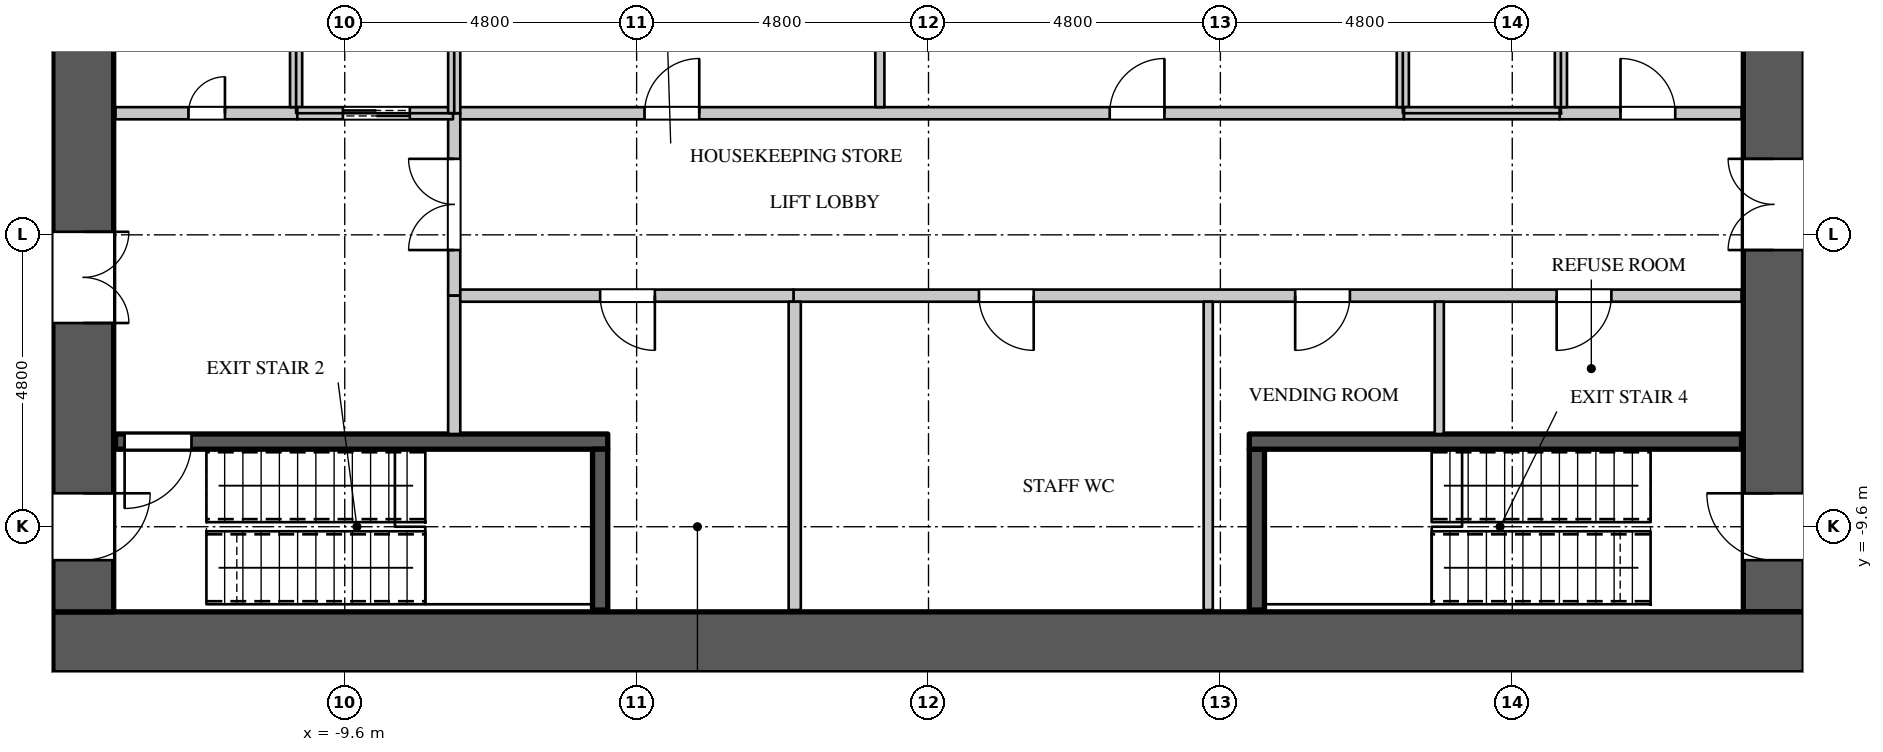
"""IFC4 building model, lengths in metres.
Left out: names, types, materials, properties, quantities, classifications, styles, units other than length and angle.
Written with IfcOpenShell. Run it as: python <this file> out.ifc"""

import sys

from ifc_helpers import new_model, si_unit, direction, frame, frame_2d, origin, place, context, subcontext, project, spatial, rectangle, extrude, element, fill, save


model = new_model("IFC4")
c1 = context("Model", 3, precision=1e-05, world=origin(), true_north=direction((0.0, 1.0)))
c2 = subcontext(c1, "Body", "Model", "MODEL_VIEW")
j1 = project(units=[si_unit("LENGTHUNIT", "METRE"), si_unit("PLANEANGLEUNIT", "RADIAN")], contexts=[c1])
p1 = place(None, origin())
s1 = spatial("IfcSite", under=j1, at=p1, CompositionType="ELEMENT")
p2 = place(p1, origin())
s2 = spatial("IfcBuilding", under=s1, at=p2, CompositionType="ELEMENT")
p3 = place(p2, frame((0.0, 0.0, 38.1)))
s3 = spatial("IfcBuildingStorey", under=s2, at=p3, CompositionType="ELEMENT", Elevation=38.1)
p4 = place(p3, frame((-14.4, -11.5, 0.0), z_axis=(0.0, 0.0, 1.0), x_axis=(1.0, 0.0, 0.0)))
e1 = element("IfcWall", 1, at=p4, inside=s3, PredefinedType="SHEAR", context=c2, shape_type="SweptSolid", body=[
    extrude(rectangle(XDim=28.8, YDim=1.0, at=frame_2d((14.4, 0.0))), origin(), (0.0, 0.0, 1.0), 4.2),
])
p5 = place(p3, frame((13.9, -11.0, 0.0), z_axis=(0.0, 0.0, 1.0), x_axis=(0.0, 1.0, 0.0)))
e2 = element("IfcWall", 2, at=p5, inside=s3, PredefinedType="SHEAR", context=c2, shape_type="SweptSolid", body=[
    extrude(rectangle(XDim=22.0, YDim=1.0, at=frame_2d((11.0, 0.0))), origin(), (0.0, 0.0, 1.0), 4.2),
])
p6 = place(p5, frame((20.05, 0.0, 0.0)))
e3 = element("IfcOpeningElement", 3, at=p6, cuts=e2, PredefinedType="OPENING", context=c2, shape_type="SweptSolid", body=[
    extrude(rectangle(XDim=1.1, YDim=2.2, at=frame_2d((0.55, 1.1))), frame((0.0, 0.51, 0.0), z_axis=(0.0, -1.0, 0.0), x_axis=(1.0, 0.0, 0.0)), (0.0, 0.0, 1.0), 1.02),
])
p7 = place(p5, frame((0.85, 0.0, 0.0)))
e4 = element("IfcOpeningElement", 4, at=p7, cuts=e2, PredefinedType="OPENING", context=c2, shape_type="SweptSolid", body=[
    extrude(rectangle(XDim=1.1, YDim=2.2, at=frame_2d((0.55, 1.1))), frame((0.0, 0.51, 0.0), z_axis=(0.0, -1.0, 0.0), x_axis=(1.0, 0.0, 0.0)), (0.0, 0.0, 1.0), 1.02),
])
p8 = place(p5, frame((14.55, 0.0, 0.0)))
e5 = element("IfcOpeningElement", 5, at=p8, cuts=e2, PredefinedType="OPENING", context=c2, shape_type="SweptSolid", body=[
    extrude(rectangle(XDim=1.5, YDim=2.4, at=frame_2d((0.75, 1.2))), frame((0.0, 0.51, 0.0), z_axis=(0.0, -1.0, 0.0), x_axis=(1.0, 0.0, 0.0)), (0.0, 0.0, 1.0), 1.02),
])
p9 = place(p5, frame((5.95, 0.0, 0.0)))
e6 = element("IfcOpeningElement", 6, at=p9, cuts=e2, PredefinedType="OPENING", context=c2, shape_type="SweptSolid", body=[
    extrude(rectangle(XDim=1.5, YDim=2.4, at=frame_2d((0.75, 1.2))), frame((0.0, 0.51, 0.0), z_axis=(0.0, -1.0, 0.0), x_axis=(1.0, 0.0, 0.0)), (0.0, 0.0, 1.0), 1.02),
])
p10 = place(p3, frame((-13.9, -11.0, 0.0), z_axis=(0.0, 0.0, 1.0), x_axis=(0.0, 1.0, 0.0)))
e7 = element("IfcWall", 7, at=p10, inside=s3, PredefinedType="SHEAR", context=c2, shape_type="SweptSolid", body=[
    extrude(rectangle(XDim=22.0, YDim=1.0, at=frame_2d((11.0, 0.0))), origin(), (0.0, 0.0, 1.0), 4.2),
])
p11 = place(p10, frame((20.05, 0.0, 0.0)))
e8 = element("IfcOpeningElement", 8, at=p11, cuts=e7, PredefinedType="OPENING", context=c2, shape_type="SweptSolid", body=[
    extrude(rectangle(XDim=1.1, YDim=2.2, at=frame_2d((0.55, 1.1))), frame((0.0, 0.51, 0.0), z_axis=(0.0, -1.0, 0.0), x_axis=(1.0, 0.0, 0.0)), (0.0, 0.0, 1.0), 1.02),
])
p12 = place(p10, frame((0.85, 0.0, 0.0)))
e9 = element("IfcOpeningElement", 9, at=p12, cuts=e7, PredefinedType="OPENING", context=c2, shape_type="SweptSolid", body=[
    extrude(rectangle(XDim=1.1, YDim=2.2, at=frame_2d((0.55, 1.1))), frame((0.0, 0.51, 0.0), z_axis=(0.0, -1.0, 0.0), x_axis=(1.0, 0.0, 0.0)), (0.0, 0.0, 1.0), 1.02),
])
p13 = place(p10, frame((15.75, 0.0, 0.0)))
e10 = element("IfcOpeningElement", 10, at=p13, cuts=e7, PredefinedType="OPENING", context=c2, shape_type="SweptSolid", body=[
    extrude(rectangle(XDim=1.5, YDim=2.4, at=frame_2d((0.75, 1.2))), frame((0.0, 0.51, 0.0), z_axis=(0.0, -1.0, 0.0), x_axis=(1.0, 0.0, 0.0)), (0.0, 0.0, 1.0), 1.02),
])
p14 = place(p10, frame((4.75, 0.0, 0.0)))
e11 = element("IfcOpeningElement", 11, at=p14, cuts=e7, PredefinedType="OPENING", context=c2, shape_type="SweptSolid", body=[
    extrude(rectangle(XDim=1.5, YDim=2.4, at=frame_2d((0.75, 1.2))), frame((0.0, 0.51, 0.0), z_axis=(0.0, -1.0, 0.0), x_axis=(1.0, 0.0, 0.0)), (0.0, 0.0, 1.0), 1.02),
])
p15 = place(p3, frame((-7.82, -2.8, 0.0), z_axis=(0.0, 0.0, 1.0), x_axis=(1.0, 0.0, 0.0)))
e12 = element("IfcWall", 12, at=p15, inside=s3, PredefinedType="PARTITIONING", context=c2, shape_type="SweptSolid", body=[
    extrude(rectangle(XDim=15.64, YDim=0.2, at=frame_2d((7.82, 0.0))), origin(), (0.0, 0.0, 1.0), 3.95),
])
p16 = place(p15, frame((3.15, 0.0, 0.0)))
e13 = element("IfcOpeningElement", 13, at=p16, cuts=e12, PredefinedType="OPENING", context=c2, shape_type="SweptSolid", body=[
    extrude(rectangle(XDim=0.9, YDim=2.2, at=frame_2d((0.45, 1.1))), frame((0.0, 0.11, 0.0), z_axis=(0.0, -1.0, 0.0), x_axis=(1.0, 0.0, 0.0)), (0.0, 0.0, 1.0), 0.22),
])
p17 = place(p15, frame((10.8, 0.0, 0.0)))
e14 = element("IfcOpeningElement", 14, at=p17, cuts=e12, PredefinedType="OPENING", context=c2, shape_type="SweptSolid", body=[
    extrude(rectangle(XDim=0.9, YDim=2.2, at=frame_2d((0.45, 1.1))), frame((0.0, 0.11, 0.0), z_axis=(0.0, -1.0, 0.0), x_axis=(1.0, 0.0, 0.0)), (0.0, 0.0, 1.0), 0.22),
])
p18 = place(p3, frame((-7.8, -5.8, 0.0), z_axis=(0.0, 0.0, 1.0), x_axis=(0.0, 1.0, 0.0)))
e15 = element("IfcWall", 15, at=p18, inside=s3, PredefinedType="PARTITIONING", context=c2, shape_type="SweptSolid", body=[
    extrude(rectangle(XDim=3.0, YDim=0.2, at=frame_2d((1.5, 0.0))), origin(), (0.0, 0.0, 1.0), 3.95),
])
p19 = place(p18, frame((0.75, 0.0, 0.0)))
e16 = element("IfcOpeningElement", 16, at=p19, cuts=e15, PredefinedType="OPENING", context=c2, shape_type="SweptSolid", body=[
    extrude(rectangle(XDim=1.5, YDim=2.4, at=frame_2d((0.75, 1.2))), frame((0.0, 0.11, 0.0), z_axis=(0.0, -1.0, 0.0), x_axis=(1.0, 0.0, 0.0)), (0.0, 0.0, 1.0), 0.22),
])
p20 = place(p3, frame((-2.22, -5.8, 0.0), z_axis=(0.0, 0.0, 1.0), x_axis=(1.0, 0.0, 0.0)))
e17 = element("IfcWall", 17, at=p20, inside=s3, PredefinedType="PARTITIONING", context=c2, shape_type="SweptSolid", body=[
    extrude(rectangle(XDim=15.59, YDim=0.2, at=frame_2d((7.795, 0.0))), origin(), (0.0, 0.0, 1.0), 3.95),
])
p21 = place(p20, frame((3.05, 0.0, 0.0)))
e18 = element("IfcOpeningElement", 18, at=p21, cuts=e17, PredefinedType="OPENING", context=c2, shape_type="SweptSolid", body=[
    extrude(rectangle(XDim=0.9, YDim=2.2, at=frame_2d((0.45, 1.1))), frame((0.0, 0.11, 0.0), z_axis=(0.0, -1.0, 0.0), x_axis=(1.0, 0.0, 0.0)), (0.0, 0.0, 1.0), 0.22),
])
p22 = place(p20, frame((8.25, 0.0, 0.0)))
e19 = element("IfcOpeningElement", 19, at=p22, cuts=e17, PredefinedType="OPENING", context=c2, shape_type="SweptSolid", body=[
    extrude(rectangle(XDim=0.9, YDim=2.2, at=frame_2d((0.45, 1.1))), frame((0.0, 0.11, 0.0), z_axis=(0.0, -1.0, 0.0), x_axis=(1.0, 0.0, 0.0)), (0.0, 0.0, 1.0), 0.22),
])
p23 = place(p20, frame((12.55, 0.0, 0.0)))
e20 = element("IfcOpeningElement", 20, at=p23, cuts=e17, PredefinedType="OPENING", context=c2, shape_type="SweptSolid", body=[
    extrude(rectangle(XDim=0.9, YDim=2.2, at=frame_2d((0.45, 1.1))), frame((0.0, 0.11, 0.0), z_axis=(0.0, -1.0, 0.0), x_axis=(1.0, 0.0, 0.0)), (0.0, 0.0, 1.0), 0.22),
])
p24 = place(p3, frame((-0.8, -2.7, 0.0), z_axis=(0.0, 0.0, 1.0), x_axis=(0.0, 1.0, 0.0)))
e21 = element("IfcWall", 21, at=p24, inside=s3, PredefinedType="PARTITIONING", context=c2, shape_type="SweptSolid", body=[
    extrude(rectangle(XDim=2.6, YDim=0.15, at=frame_2d((1.3, 0.0))), origin(), (0.0, 0.0, 1.0), 3.95),
])
p25 = place(p3, frame((4.6, -10.97, 0.0), z_axis=(0.0, 0.0, 1.0), x_axis=(0.0, 1.0, 0.0)))
e22 = element("IfcWall", 22, at=p25, inside=s3, PredefinedType="PARTITIONING", context=c2, shape_type="SweptSolid", body=[
    extrude(rectangle(XDim=5.07, YDim=0.15, at=frame_2d((2.535, 0.0))), origin(), (0.0, 0.0, 1.0), 3.95),
])
p26 = place(p3, frame((8.4, -8.075, 0.0), z_axis=(0.0, 0.0, 1.0), x_axis=(0.0, 1.0, 0.0)))
e23 = element("IfcWall", 23, at=p26, inside=s3, PredefinedType="PARTITIONING", context=c2, shape_type="SweptSolid", body=[
    extrude(rectangle(XDim=2.175, YDim=0.15, at=frame_2d((1.087, 0.0))), origin(), (0.0, 0.0, 1.0), 3.95),
])
p27 = place(p3, frame((-13.37, -2.8, 0.0), z_axis=(0.0, 0.0, 1.0), x_axis=(1.0, 0.0, 0.0)))
e24 = element("IfcWall", 24, at=p27, inside=s3, PredefinedType="PARTITIONING", context=c2, shape_type="SweptSolid", body=[
    extrude(rectangle(XDim=2.99, YDim=0.2, at=frame_2d((1.495, 0.0))), origin(), (0.0, 0.0, 1.0), 3.95),
])
p28 = place(p27, frame((1.2, 0.0, 0.0)))
e25 = element("IfcOpeningElement", 25, at=p28, cuts=e24, PredefinedType="OPENING", context=c2, shape_type="SweptSolid", body=[
    extrude(rectangle(XDim=0.6, YDim=2.0, at=frame_2d((0.3, 1.0))), frame((0.0, 0.11, 0.0), z_axis=(0.0, -1.0, 0.0), x_axis=(1.0, 0.0, 0.0)), (0.0, 0.0, 1.0), 0.22),
])
p29 = place(p3, frame((-7.8, -8.075, 0.0), z_axis=(0.0, 0.0, 1.0), x_axis=(0.0, 1.0, 0.0)))
e26 = element("IfcWall", 26, at=p29, inside=s3, PredefinedType="PARTITIONING", context=c2, shape_type="SweptSolid", body=[
    extrude(rectangle(XDim=2.275, YDim=0.2, at=frame_2d((1.137, 0.0))), origin(), (0.0, 0.0, 1.0), 3.95),
])
p30 = place(p3, frame((-7.7, -5.8, 0.0), z_axis=(0.0, 0.0, 1.0), x_axis=(1.0, 0.0, 0.0)))
e27 = element("IfcWall", 27, at=p30, inside=s3, PredefinedType="PARTITIONING", context=c2, shape_type="SweptSolid", body=[
    extrude(rectangle(XDim=5.48, YDim=0.2, at=frame_2d((2.74, 0.0))), origin(), (0.0, 0.0, 1.0), 3.95),
])
p31 = place(p30, frame((2.3, 0.0, 0.0)))
e28 = element("IfcOpeningElement", 28, at=p31, cuts=e27, PredefinedType="OPENING", context=c2, shape_type="SweptSolid", body=[
    extrude(rectangle(XDim=0.9, YDim=2.2, at=frame_2d((0.45, 1.1))), frame((0.0, 0.11, 0.0), z_axis=(0.0, -1.0, 0.0), x_axis=(1.0, 0.0, 0.0)), (0.0, 0.0, 1.0), 0.22),
])
p32 = place(p3, frame((-2.2, -10.97, 0.0), z_axis=(0.0, 0.0, 1.0), x_axis=(0.0, 1.0, 0.0)))
e29 = element("IfcWall", 29, at=p32, inside=s3, PredefinedType="PARTITIONING", context=c2, shape_type="SweptSolid", body=[
    extrude(rectangle(XDim=5.07, YDim=0.2, at=frame_2d((2.535, 0.0))), origin(), (0.0, 0.0, 1.0), 3.95),
])
p33 = place(p3, frame((10.38, -2.8, 0.0), z_axis=(0.0, 0.0, 1.0), x_axis=(1.0, 0.0, 0.0)))
e30 = element("IfcWall", 30, at=p33, inside=s3, PredefinedType="PARTITIONING", context=c2, shape_type="SweptSolid", body=[
    extrude(rectangle(XDim=2.99, YDim=0.2, at=frame_2d((1.495, 0.0))), origin(), (0.0, 0.0, 1.0), 3.95),
])
p34 = place(p33, frame((1.0, 0.0, 0.0)))
e31 = element("IfcOpeningElement", 31, at=p34, cuts=e30, PredefinedType="OPENING", context=c2, shape_type="SweptSolid", body=[
    extrude(rectangle(XDim=0.9, YDim=2.2, at=frame_2d((0.45, 1.1))), frame((0.0, 0.11, 0.0), z_axis=(0.0, -1.0, 0.0), x_axis=(1.0, 0.0, 0.0)), (0.0, 0.0, 1.0), 0.22),
])
p35 = place(p3, frame((-10.4, -2.7, 0.0), z_axis=(0.0, 0.0, 1.0), x_axis=(0.0, 1.0, 0.0)))
e32 = element("IfcWall", 32, at=p35, inside=s3, PredefinedType="PARTITIONING", context=c2, shape_type="SweptSolid", body=[
    extrude(rectangle(XDim=2.7, YDim=0.2, at=frame_2d((1.35, 0.0))), origin(), (0.0, 0.0, 1.0), 3.95),
])
p36 = place(p3, frame((-10.38, -2.8, 0.0), z_axis=(0.0, 0.0, 1.0), x_axis=(1.0, 0.0, 0.0)))
e33 = element("IfcWall", 33, at=p36, inside=s3, PredefinedType="PARTITIONING", context=c2, shape_type="SweptSolid", body=[
    extrude(rectangle(XDim=2.56, YDim=0.2, at=frame_2d((1.28, 0.0))), origin(), (0.0, 0.0, 1.0), 3.95),
])
p37 = place(p36, frame((0.75, 0.0, 0.0)))
e34 = element("IfcOpeningElement", 34, at=p37, cuts=e33, PredefinedType="OPENING", context=c2, shape_type="SweptSolid", body=[
    extrude(rectangle(XDim=1.1, YDim=2.2, at=frame_2d((0.55, 1.1))), frame((0.0, 0.11, 0.0), z_axis=(0.0, -1.0, 0.0), x_axis=(1.0, 0.0, 0.0)), (0.0, 0.0, 1.0), 0.22),
])
p38 = place(p3, frame((-7.8, -2.8, 0.0), z_axis=(0.0, 0.0, 1.0), x_axis=(0.0, 1.0, 0.0)))
e35 = element("IfcWall", 35, at=p38, inside=s3, PredefinedType="PARTITIONING", context=c2, shape_type="SweptSolid", body=[
    extrude(rectangle(XDim=2.8, YDim=0.2, at=frame_2d((1.4, 0.0))), origin(), (0.0, 0.0, 1.0), 3.95),
])
p39 = place(p3, frame((7.8, -2.7, 0.0), z_axis=(0.0, 0.0, 1.0), x_axis=(0.0, 1.0, 0.0)))
e36 = element("IfcWall", 36, at=p39, inside=s3, PredefinedType="PARTITIONING", context=c2, shape_type="SweptSolid", body=[
    extrude(rectangle(XDim=2.7, YDim=0.2, at=frame_2d((1.35, 0.0))), origin(), (0.0, 0.0, 1.0), 3.95),
])
p40 = place(p3, frame((7.82, -2.8, 0.0), z_axis=(0.0, 0.0, 1.0), x_axis=(1.0, 0.0, 0.0)))
e37 = element("IfcWall", 37, at=p40, inside=s3, PredefinedType="PARTITIONING", context=c2, shape_type="SweptSolid", body=[
    extrude(rectangle(XDim=2.56, YDim=0.2, at=frame_2d((1.28, 0.0))), origin(), (0.0, 0.0, 1.0), 3.95),
])
p41 = place(p3, frame((10.4, -2.7, 0.0), z_axis=(0.0, 0.0, 1.0), x_axis=(0.0, 1.0, 0.0)))
e38 = element("IfcWall", 38, at=p41, inside=s3, PredefinedType="PARTITIONING", context=c2, shape_type="SweptSolid", body=[
    extrude(rectangle(XDim=5.4, YDim=0.2, at=frame_2d((2.7, 0.0))), origin(), (0.0, 0.0, 1.0), 3.95),
])
p42 = place(p3, frame((-13.37, -8.2, 0.0), z_axis=(0.0, 0.0, 1.0), x_axis=(1.0, 0.0, 0.0)))
e39 = element("IfcWall", 39, at=p42, inside=s3, PredefinedType="SHEAR", context=c2, shape_type="SweptSolid", body=[
    extrude(rectangle(XDim=8.095, YDim=0.25, at=frame_2d((4.048, 0.0))), origin(), (0.0, 0.0, 1.0), 3.95),
])
p43 = place(p42, frame((0.15, 0.0, 0.0)))
e40 = element("IfcOpeningElement", 40, at=p43, cuts=e39, PredefinedType="OPENING", context=c2, shape_type="SweptSolid", body=[
    extrude(rectangle(XDim=1.1, YDim=2.2, at=frame_2d((0.55, 1.1))), frame((0.0, 0.135, 0.0), z_axis=(0.0, -1.0, 0.0), x_axis=(1.0, 0.0, 0.0)), (0.0, 0.0, 1.0), 0.27),
])
for number, where, z_axis, x_axis in (
    (41, (-5.4, -10.97, 0.0), (0.0, 0.0, 1.0), (0.0, 1.0, 0.0)),
    (42, (5.4, -10.97, 0.0), (0.0, 0.0, 1.0), (0.0, 1.0, 0.0)),
):
    element("IfcWall", number, at=place(p3, frame(where, z_axis=z_axis, x_axis=x_axis)), inside=s3, PredefinedType="SHEAR", context=c2, shape_type="SweptSolid", body=[
        extrude(rectangle(XDim=2.645, YDim=0.25, at=frame_2d((1.323, 0.0))), origin(), (0.0, 0.0, 1.0), 3.95),
    ])
p44 = place(p3, frame((5.275, -8.2, 0.0), z_axis=(0.0, 0.0, 1.0), x_axis=(1.0, 0.0, 0.0)))
e43 = element("IfcWall", 43, at=p44, inside=s3, PredefinedType="SHEAR", context=c2, shape_type="SweptSolid", body=[
    extrude(rectangle(XDim=8.095, YDim=0.25, at=frame_2d((4.048, 0.0))), origin(), (0.0, 0.0, 1.0), 3.95),
])
p45 = place(p28, origin())
e44 = element("IfcDoor", 44, at=p45, inside=s3, OperationType="SINGLE_SWING_RIGHT", PredefinedType="DOOR", context=c2, shape_type="SweptSolid", body=[
    extrude(rectangle(XDim=0.6, YDim=2.0, at=frame_2d((0.3, 1.0))), frame((0.0, 0.025, 0.0), z_axis=(0.0, -1.0, 0.0), x_axis=(1.0, 0.0, 0.0)), (0.0, 0.0, 1.0), 0.05),
])
fill(e25, e44)
p46 = place(p34, origin())
e45 = element("IfcDoor", 45, at=p46, inside=s3, OperationType="SINGLE_SWING_LEFT", PredefinedType="DOOR", context=c2, shape_type="SweptSolid", body=[
    extrude(rectangle(XDim=0.9, YDim=2.2, at=frame_2d((0.45, 1.1))), frame((0.0, 0.025, 0.0), z_axis=(0.0, -1.0, 0.0), x_axis=(1.0, 0.0, 0.0)), (0.0, 0.0, 1.0), 0.05),
])
fill(e31, e45)
p47 = place(p31, origin())
e46 = element("IfcDoor", 46, at=p47, inside=s3, OperationType="SINGLE_SWING_LEFT", PredefinedType="DOOR", context=c2, shape_type="SweptSolid", body=[
    extrude(rectangle(XDim=0.9, YDim=2.2, at=frame_2d((0.45, 1.1))), frame((0.0, 0.025, 0.0), z_axis=(0.0, -1.0, 0.0), x_axis=(1.0, 0.0, 0.0)), (0.0, 0.0, 1.0), 0.05),
])
fill(e28, e46)
p48 = place(p21, origin())
e47 = element("IfcDoor", 47, at=p48, inside=s3, OperationType="SINGLE_SWING_LEFT", PredefinedType="DOOR", context=c2, shape_type="SweptSolid", body=[
    extrude(rectangle(XDim=0.9, YDim=2.2, at=frame_2d((0.45, 1.1))), frame((0.0, 0.025, 0.0), z_axis=(0.0, -1.0, 0.0), x_axis=(1.0, 0.0, 0.0)), (0.0, 0.0, 1.0), 0.05),
])
fill(e18, e47)
p49 = place(p22, origin())
e48 = element("IfcDoor", 48, at=p49, inside=s3, OperationType="SINGLE_SWING_RIGHT", PredefinedType="DOOR", context=c2, shape_type="SweptSolid", body=[
    extrude(rectangle(XDim=0.9, YDim=2.2, at=frame_2d((0.45, 1.1))), frame((0.0, 0.025, 0.0), z_axis=(0.0, -1.0, 0.0), x_axis=(1.0, 0.0, 0.0)), (0.0, 0.0, 1.0), 0.05),
])
fill(e19, e48)
p50 = place(p23, origin())
e49 = element("IfcDoor", 49, at=p50, inside=s3, OperationType="SINGLE_SWING_RIGHT", PredefinedType="DOOR", context=c2, shape_type="SweptSolid", body=[
    extrude(rectangle(XDim=0.9, YDim=2.2, at=frame_2d((0.45, 1.1))), frame((0.0, 0.025, 0.0), z_axis=(0.0, -1.0, 0.0), x_axis=(1.0, 0.0, 0.0)), (0.0, 0.0, 1.0), 0.05),
])
fill(e20, e49)
p51 = place(p16, origin())
e50 = element("IfcDoor", 50, at=p51, inside=s3, OperationType="SINGLE_SWING_RIGHT", PredefinedType="DOOR", context=c2, shape_type="SweptSolid", body=[
    extrude(rectangle(XDim=0.9, YDim=2.2, at=frame_2d((0.45, 1.1))), frame((0.0, 0.025, 0.0), z_axis=(0.0, -1.0, 0.0), x_axis=(1.0, 0.0, 0.0)), (0.0, 0.0, 1.0), 0.05),
])
fill(e13, e50)
p52 = place(p17, origin())
e51 = element("IfcDoor", 51, at=p52, inside=s3, OperationType="SINGLE_SWING_RIGHT", PredefinedType="DOOR", context=c2, shape_type="SweptSolid", body=[
    extrude(rectangle(XDim=0.9, YDim=2.2, at=frame_2d((0.45, 1.1))), frame((0.0, 0.025, 0.0), z_axis=(0.0, -1.0, 0.0), x_axis=(1.0, 0.0, 0.0)), (0.0, 0.0, 1.0), 0.05),
])
fill(e14, e51)
p53 = place(p37, origin())
e52 = element("IfcDoor", 52, at=p53, inside=s3, OperationType="DOUBLE_DOOR_SLIDING", PredefinedType="DOOR", context=c2, shape_type="SweptSolid", body=[
    extrude(rectangle(XDim=1.1, YDim=2.2, at=frame_2d((0.55, 1.1))), frame((0.0, 0.025, 0.0), z_axis=(0.0, -1.0, 0.0), x_axis=(1.0, 0.0, 0.0)), (0.0, 0.0, 1.0), 0.05),
])
fill(e34, e52)
p54 = place(p43, origin())
e53 = element("IfcDoor", 53, at=p54, inside=s3, OperationType="SINGLE_SWING_RIGHT", PredefinedType="DOOR", context=c2, shape_type="SweptSolid", body=[
    extrude(rectangle(XDim=1.1, YDim=2.2, at=frame_2d((0.55, 1.1))), frame((0.0, 0.025, 0.0), z_axis=(0.0, -1.0, 0.0), x_axis=(1.0, 0.0, 0.0)), (0.0, 0.0, 1.0), 0.05),
])
fill(e40, e53)
p55 = place(p19, origin())
e54 = element("IfcDoor", 54, at=p55, inside=s3, OperationType="DOUBLE_DOOR_SINGLE_SWING", PredefinedType="DOOR", context=c2, shape_type="SweptSolid", body=[
    extrude(rectangle(XDim=1.5, YDim=2.4, at=frame_2d((0.75, 1.2))), frame((0.0, 0.025, 0.0), z_axis=(0.0, -1.0, 0.0), x_axis=(1.0, 0.0, 0.0)), (0.0, 0.0, 1.0), 0.05),
])
fill(e16, e54)
p56 = place(p12, origin())
e55 = element("IfcDoor", 55, at=p56, inside=s3, OperationType="SINGLE_SWING_LEFT", PredefinedType="DOOR", context=c2, shape_type="SweptSolid", body=[
    extrude(rectangle(XDim=1.1, YDim=2.2, at=frame_2d((0.55, 1.1))), frame((0.0, -0.445, 0.0), z_axis=(0.0, -1.0, 0.0), x_axis=(1.0, 0.0, 0.0)), (0.0, 0.0, 1.0), 0.05),
])
fill(e9, e55)
p57 = place(p7, origin())
e56 = element("IfcDoor", 56, at=p57, inside=s3, OperationType="SINGLE_SWING_RIGHT", PredefinedType="DOOR", context=c2, shape_type="SweptSolid", body=[
    extrude(rectangle(XDim=1.1, YDim=2.2, at=frame_2d((0.55, 1.1))), frame((0.0, 0.495, 0.0), z_axis=(0.0, -1.0, 0.0), x_axis=(1.0, 0.0, 0.0)), (0.0, 0.0, 1.0), 0.05),
])
fill(e4, e56)
p58 = place(p14, origin())
e57 = element("IfcDoor", 57, at=p58, inside=s3, OperationType="DOUBLE_DOOR_SINGLE_SWING", PredefinedType="DOOR", context=c2, shape_type="SweptSolid", body=[
    extrude(rectangle(XDim=1.5, YDim=2.4, at=frame_2d((0.75, 1.2))), frame((0.0, -0.445, 0.0), z_axis=(0.0, -1.0, 0.0), x_axis=(1.0, 0.0, 0.0)), (0.0, 0.0, 1.0), 0.05),
])
fill(e11, e57)
p59 = place(p9, origin())
e58 = element("IfcDoor", 58, at=p59, inside=s3, OperationType="DOUBLE_DOOR_SINGLE_SWING", PredefinedType="DOOR", context=c2, shape_type="SweptSolid", body=[
    extrude(rectangle(XDim=1.5, YDim=2.4, at=frame_2d((0.75, 1.2))), frame((0.0, 0.495, 0.0), z_axis=(0.0, -1.0, 0.0), x_axis=(1.0, 0.0, 0.0)), (0.0, 0.0, 1.0), 0.05),
])
fill(e6, e58)
save(model, sys.argv[1])
